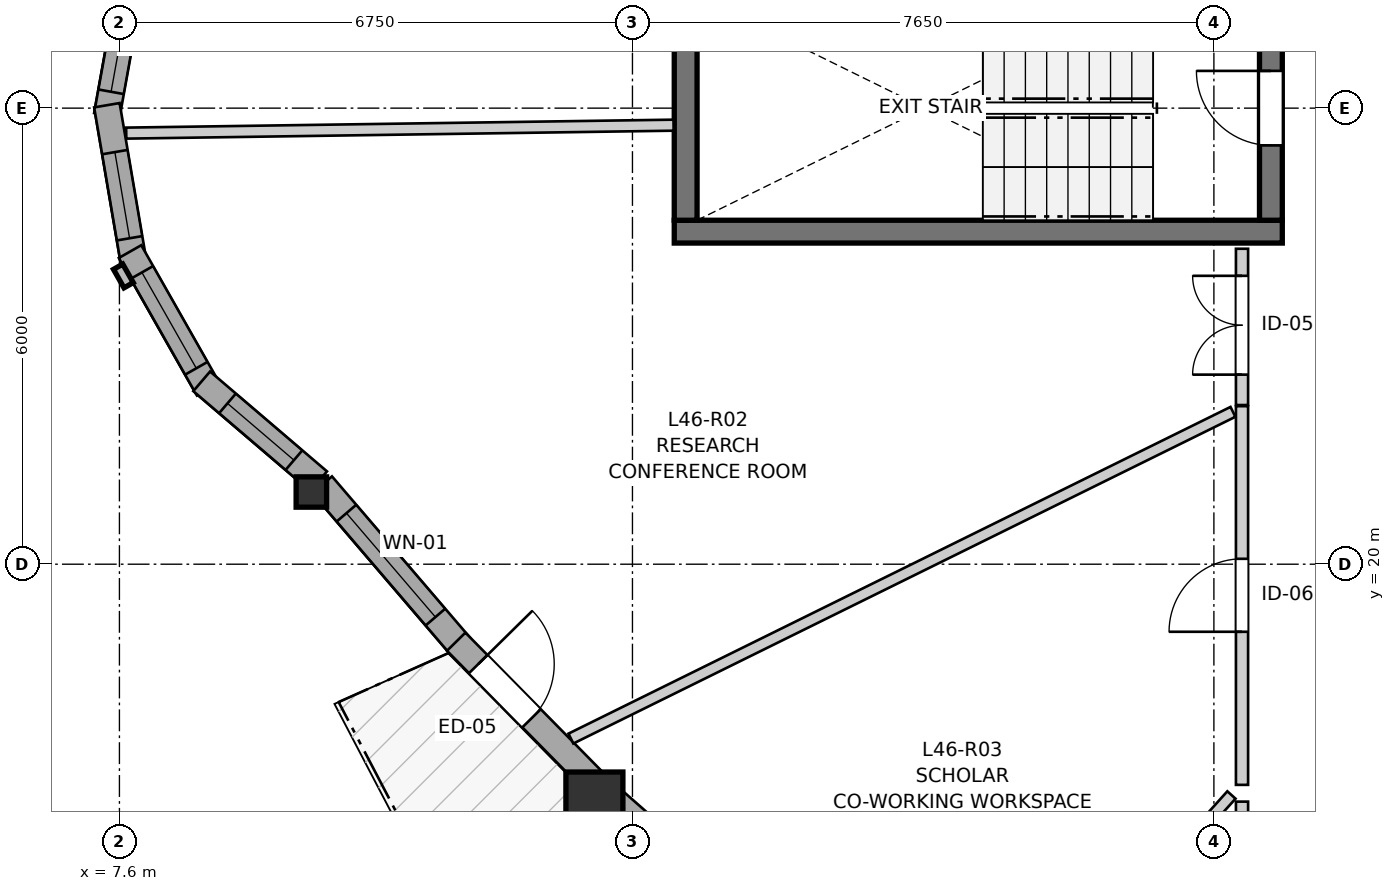
"""IFC4 building model, lengths in metres.
Left out: names, types, materials, properties, quantities, classifications, styles, units other than length and angle.
Written with IfcOpenShell. Run it as: python <this file> out.ifc"""

import sys

from ifc_helpers import new_model, si_unit, direction, frame, frame_2d, origin, origin_2d, place, context, subcontext, project, spatial, rectangle, i_section, extrude, source, transform, mapped, element, fill, save


model = new_model("IFC4")
c1 = context("Model", 3, precision=1e-05, world=origin(), true_north=direction((0.0, 1.0)))
c2 = subcontext(c1, "Body", "Model", "MODEL_VIEW")
j1 = project(units=[si_unit("LENGTHUNIT", "METRE"), si_unit("PLANEANGLEUNIT", "RADIAN")], contexts=[c1])
p1 = place(None, origin())
s1 = spatial("IfcSite", under=j1, at=p1, CompositionType="ELEMENT")
p2 = place(p1, origin())
s2 = spatial("IfcBuilding", under=s1, at=p2, CompositionType="ELEMENT")
p3 = place(p2, frame((0.0, 0.0, 155.4)))
s3 = spatial("IfcBuildingStorey", under=s2, at=p3, CompositionType="ELEMENT", Elevation=155.4)
p4 = place(p3, frame((14.9, 24.375, 0.0), z_axis=(0.0, 0.0, 1.0), x_axis=(1.0, 0.0, 0.0)))
e1 = element("IfcWall", 1, at=p4, inside=s3, PredefinedType="SHEAR", context=c2, shape_type="SweptSolid", body=[
    extrude(rectangle(XDim=8.0, YDim=0.3, at=frame_2d((4.0, 0.0))), origin(), (0.0, 0.0, 1.0), 2.935),
])
p5 = place(p3, frame((15.05, 27.475, 0.0), z_axis=(0.0, 0.0, 1.0), x_axis=(0.0, -1.0, 0.0)))
e2 = element("IfcWall", 2, at=p5, inside=s3, PredefinedType="SHEAR", context=c2, shape_type="SweptSolid", body=[
    extrude(rectangle(XDim=2.95, YDim=0.3, at=frame_2d((1.475, 0.0))), origin(), (0.0, 0.0, 1.0), 2.935),
])
p6 = place(p3, frame((22.75, 24.525, 0.0), z_axis=(0.0, 0.0, 1.0), x_axis=(0.0, 1.0, 0.0)))
e3 = element("IfcWall", 3, at=p6, inside=s3, PredefinedType="SHEAR", context=c2, shape_type="SweptSolid", body=[
    extrude(rectangle(XDim=2.95, YDim=0.3, at=frame_2d((1.475, 0.0))), origin(), (0.0, 0.0, 1.0), 2.935),
])
p7 = place(p6, frame((0.985, 0.0, 0.0)))
e4 = element("IfcOpeningElement", 4, at=p7, cuts=e3, PredefinedType="OPENING", context=c2, shape_type="SweptSolid", body=[
    extrude(rectangle(XDim=0.98, YDim=2.15, at=frame_2d((0.49, 1.075))), frame((0.0, 0.16, 0.0), z_axis=(0.0, -1.0, 0.0), x_axis=(1.0, 0.0, 0.0)), (0.0, 0.0, 1.0), 0.32),
])
m1 = source(origin(), c2, "Body", "SweptSolid", [
    extrude(i_section(OverallWidth=0.401, OverallDepth=0.399, WebThickness=0.023, FlangeThickness=0.036, FilletRadius=0.015, at=origin_2d()), origin(), (0.0, 0.0, 1.0), 2.935),
])
p8 = place(p3, frame((10.125, 20.95, 0.0), z_axis=(0.0, 0.0, 1.0), x_axis=(1.0, 0.0, 0.0)))
e5 = element("IfcColumn", 5, at=p8, inside=s3, PredefinedType="PILASTER", context=c2, shape_type="MappedRepresentation", body=[
    mapped(m1, transform((0.0, 0.0, 0.0), x_axis=(1.0, 0.0, 0.0), y_axis=(0.0, 1.0, 0.0), z_axis=(0.0, 0.0, 1.0), scale=1.0)),
])
m2 = source(origin(), c2, "Body", "SweptSolid", [
    extrude(rectangle(XDim=0.75, YDim=0.75, at=origin_2d()), origin(), (0.0, 0.0, 1.0), 2.935),
])
p9 = place(p3, frame((13.849, 16.891, 0.0), z_axis=(0.0, 0.0, 1.0), x_axis=(1.0, 0.0, 0.0)))
e6 = element("IfcColumn", 6, at=p9, inside=s3, PredefinedType="COLUMN", context=c2, shape_type="MappedRepresentation", body=[
    mapped(m2, transform((0.0, 0.0, 0.0), x_axis=(1.0, 0.0, 0.0), y_axis=(0.0, 1.0, 0.0), z_axis=(0.0, 0.0, 1.0), scale=1.0)),
])
p10 = place(p3, frame((7.804, 27.953, 0.0), z_axis=(0.0, 0.0, 1.0), x_axis=(-0.177605215389, -0.984101817632, 0.0)))
e7 = element("IfcWall", 7, at=p10, inside=s3, PredefinedType="SOLIDWALL", context=c2, shape_type="SweptSolid", body=[
    extrude(rectangle(XDim=2.081, YDim=0.34, at=frame_2d((1.041, 0.0))), origin(), (0.0, 0.0, 1.0), 2.515),
])
p11 = place(p10, frame((0.316, 0.0, 0.82)))
e8 = element("IfcOpeningElement", 8, at=p11, cuts=e7, PredefinedType="OPENING", context=c2, shape_type="SweptSolid", body=[
    extrude(rectangle(XDim=1.45, YDim=1.25, at=frame_2d((0.725, 0.625))), frame((0.0, 0.18, 0.0), z_axis=(0.0, -1.0, 0.0), x_axis=(1.0, 0.0, 0.0)), (0.0, 0.0, 1.0), 0.36),
])
p12 = place(p3, frame((7.435, 26.038, 0.0), z_axis=(0.0, 0.0, 1.0), x_axis=(0.168107405166, -0.985768685001, 0.0)))
e9 = element("IfcWall", 9, at=p12, inside=s3, PredefinedType="SOLIDWALL", context=c2, shape_type="SweptSolid", body=[
    extrude(rectangle(XDim=2.081, YDim=0.34, at=frame_2d((1.041, 0.0))), origin(), (0.0, 0.0, 1.0), 2.515),
])
p13 = place(p12, frame((0.625, 0.0, 0.82)))
e10 = element("IfcOpeningElement", 10, at=p13, cuts=e9, PredefinedType="OPENING", context=c2, shape_type="SweptSolid", body=[
    extrude(rectangle(XDim=1.15, YDim=1.2, at=frame_2d((0.575, 0.6))), frame((0.0, 0.18, 0.0), z_axis=(0.0, -1.0, 0.0), x_axis=(1.0, 0.0, 0.0)), (0.0, 0.0, 1.0), 0.36),
])
p14 = place(p3, frame((7.74, 24.113, 0.0), z_axis=(0.0, 0.0, 1.0), x_axis=(0.493660675866, -0.869654607936, 0.0)))
e11 = element("IfcWall", 11, at=p14, inside=s3, PredefinedType="SOLIDWALL", context=c2, shape_type="SweptSolid", body=[
    extrude(rectangle(XDim=2.081, YDim=0.34, at=frame_2d((1.041, 0.0))), origin(), (0.0, 0.0, 1.0), 2.515),
])
p15 = place(p14, frame((0.316, 0.0, 0.82)))
e12 = element("IfcOpeningElement", 12, at=p15, cuts=e11, PredefinedType="OPENING", context=c2, shape_type="SweptSolid", body=[
    extrude(rectangle(XDim=1.45, YDim=1.25, at=frame_2d((0.725, 0.625))), frame((0.0, 0.18, 0.0), z_axis=(0.0, -1.0, 0.0), x_axis=(1.0, 0.0, 0.0)), (0.0, 0.0, 1.0), 0.36),
])
p16 = place(p3, frame((8.682, 22.406, 0.0), z_axis=(0.0, 0.0, 1.0), x_axis=(0.760269373804, -0.649607942728, 0.0)))
e13 = element("IfcWall", 13, at=p16, inside=s3, PredefinedType="SOLIDWALL", context=c2, shape_type="SweptSolid", body=[
    extrude(rectangle(XDim=2.023, YDim=0.34, at=frame_2d((1.012, 0.0))), origin(), (0.0, 0.0, 1.0), 2.515),
])
p17 = place(p16, frame((0.447, 0.0, 0.82)))
e14 = element("IfcOpeningElement", 14, at=p17, cuts=e13, PredefinedType="OPENING", context=c2, shape_type="SweptSolid", body=[
    extrude(rectangle(XDim=1.15, YDim=1.2, at=frame_2d((0.575, 0.6))), frame((0.0, 0.18, 0.0), z_axis=(0.0, -1.0, 0.0), x_axis=(1.0, 0.0, 0.0)), (0.0, 0.0, 1.0), 0.36),
])
p18 = place(p3, frame((10.267, 21.045, 0.0), z_axis=(0.0, 0.0, 1.0), x_axis=(0.650339388137, -0.759643785098, 0.0)))
e15 = element("IfcWall", 15, at=p18, inside=s3, PredefinedType="SOLIDWALL", context=c2, shape_type="SweptSolid", body=[
    extrude(rectangle(XDim=2.803, YDim=0.34, at=frame_2d((1.402, 0.0))), origin(), (0.0, 0.0, 1.0), 2.515),
])
p19 = place(p18, frame((0.491, 0.0, 0.82)))
e16 = element("IfcOpeningElement", 16, at=p19, cuts=e15, PredefinedType="OPENING", context=c2, shape_type="SweptSolid", body=[
    extrude(rectangle(XDim=1.8, YDim=1.45, at=frame_2d((0.9, 0.725))), frame((0.0, 0.18, 0.0), z_axis=(0.0, -1.0, 0.0), x_axis=(1.0, 0.0, 0.0)), (0.0, 0.0, 1.0), 0.36),
])
p20 = place(p3, frame((12.031, 18.98, 0.0), z_axis=(0.0, 0.0, 1.0), x_axis=(0.701518749222, -0.712650997677, 0.0)))
e17 = element("IfcWall", 17, at=p20, inside=s3, PredefinedType="SOLIDWALL", context=c2, shape_type="SweptSolid", body=[
    extrude(rectangle(XDim=2.61, YDim=0.34, at=frame_2d((1.305, 0.0))), origin(), (0.0, 0.0, 1.0), 2.515),
])
p21 = place(p20, frame((0.413, 0.0, 0.0)))
e18 = element("IfcOpeningElement", 18, at=p21, cuts=e17, PredefinedType="OPENING", context=c2, shape_type="SweptSolid", body=[
    extrude(rectangle(XDim=1.0, YDim=2.1, at=frame_2d((0.5, 1.05))), frame((0.0, 0.18, 0.0), z_axis=(0.0, -1.0, 0.0), x_axis=(1.0, 0.0, 0.0)), (0.0, 0.0, 1.0), 0.36),
])
p22 = place(p3, frame((14.078, 16.916, 0.0), z_axis=(0.0, 0.0, 1.0), x_axis=(0.751177768463, -0.660099962253, 0.0)))
e19 = element("IfcWall", 19, at=p22, inside=s3, PredefinedType="SOLIDWALL", context=c2, shape_type="SweptSolid", body=[
    extrude(rectangle(XDim=2.565, YDim=0.34, at=frame_2d((1.283, 0.0))), origin(), (0.0, 0.0, 1.0), 2.515),
])
p23 = place(p22, frame((0.528, 0.0, 0.82)))
e20 = element("IfcOpeningElement", 20, at=p23, cuts=e19, PredefinedType="OPENING", context=c2, shape_type="SweptSolid", body=[
    extrude(rectangle(XDim=1.5, YDim=1.45, at=frame_2d((0.75, 0.725))), frame((0.0, 0.18, 0.0), z_axis=(0.0, -1.0, 0.0), x_axis=(1.0, 0.0, 0.0)), (0.0, 0.0, 1.0), 0.36),
])
p24 = place(p3, frame((22.37, 17.097, 0.0), z_axis=(0.0, 0.0, 1.0), x_axis=(0.0, 1.0, 0.0)))
e21 = element("IfcWall", 21, at=p24, inside=s3, PredefinedType="PARTITIONING", context=c2, shape_type="SweptSolid", body=[
    extrude(rectangle(XDim=4.982, YDim=0.16, at=frame_2d((2.491, 0.0))), origin(), (0.0, 0.0, 1.0), 2.935),
])
p25 = place(p24, frame((2.014, 0.0, 0.0)))
e22 = element("IfcOpeningElement", 22, at=p25, cuts=e21, PredefinedType="OPENING", context=c2, shape_type="SweptSolid", body=[
    extrude(rectangle(XDim=0.96, YDim=2.1, at=frame_2d((0.48, 1.05))), frame((0.0, 0.09, 0.0), z_axis=(0.0, -1.0, 0.0), x_axis=(1.0, 0.0, 0.0)), (0.0, 0.0, 1.0), 0.18),
])
p26 = place(p3, frame((22.37, 22.094, 0.0), z_axis=(0.0, 0.0, 1.0), x_axis=(0.0, 1.0, 0.0)))
e23 = element("IfcWall", 23, at=p26, inside=s3, PredefinedType="PARTITIONING", context=c2, shape_type="SweptSolid", body=[
    extrude(rectangle(XDim=2.056, YDim=0.16, at=frame_2d((1.028, 0.0))), origin(), (0.0, 0.0, 1.0), 2.935),
])
p27 = place(p26, frame((0.4, 0.0, 0.0)))
e24 = element("IfcOpeningElement", 24, at=p27, cuts=e23, PredefinedType="OPENING", context=c2, shape_type="SweptSolid", body=[
    extrude(rectangle(XDim=1.3, YDim=2.1, at=frame_2d((0.65, 1.05))), frame((0.0, 0.09, 0.0), z_axis=(0.0, -1.0, 0.0), x_axis=(1.0, 0.0, 0.0)), (0.0, 0.0, 1.0), 0.18),
])
p28 = place(p3, frame((13.54, 17.706, 0.0), z_axis=(0.0, 0.0, 1.0), x_axis=(0.896762400541, 0.442512369291, 0.0)))
e25 = element("IfcWall", 25, at=p28, inside=s3, PredefinedType="PARTITIONING", context=c2, shape_type="SweptSolid", body=[
    extrude(rectangle(XDim=9.713, YDim=0.145, at=frame_2d((4.857, 0.0))), origin(), (0.0, 0.0, 1.0), 2.935),
])
p29 = place(p3, frame((7.689, 25.671, 0.0), z_axis=(0.0, 0.0, 1.0), x_axis=(0.999894747293, 0.014508422953, 0.0)))
e26 = element("IfcWall", 26, at=p29, inside=s3, PredefinedType="PARTITIONING", context=c2, shape_type="SweptSolid", body=[
    extrude(rectangle(XDim=7.202, YDim=0.145, at=frame_2d((3.601, 0.0))), origin(), (0.0, 0.0, 1.0), 2.935),
])
p30 = place(p3, frame((18.957, 13.322, 0.0), z_axis=(0.0, 0.0, 1.0), x_axis=(0.66841369867, 0.743789706456, 0.0)))
e27 = element("IfcWall", 27, at=p30, inside=s3, PredefinedType="PARTITIONING", context=c2, shape_type="SweptSolid", body=[
    extrude(rectangle(XDim=4.897, YDim=0.145, at=frame_2d((2.449, 0.0))), origin(), (0.0, 0.0, 1.0), 2.935),
])
p31 = place(p3, frame((22.37, 14.538, 0.0), z_axis=(0.0, 0.0, 1.0), x_axis=(0.0, 1.0, 0.0)))
e28 = element("IfcWall", 28, at=p31, inside=s3, PredefinedType="PARTITIONING", context=c2, shape_type="SweptSolid", body=[
    extrude(rectangle(XDim=2.338, YDim=0.16, at=frame_2d((1.169, 0.0))), origin(), (0.0, 0.0, 1.0), 2.935),
])
m3 = source(origin(), c2, "Body", "SweptSolid", [
    extrude(rectangle(XDim=1.45, YDim=1.25, at=frame_2d((0.725, 0.625))), frame((0.0, 0.03, 0.0), z_axis=(0.0, -1.0, 0.0), x_axis=(1.0, 0.0, 0.0)), (0.0, 0.0, 1.0), 0.06),
])
p32 = place(p11, origin())
e29 = element("IfcWindow", 29, at=p32, inside=s3, PartitioningType="SINGLE_PANEL", PredefinedType="WINDOW", context=c2, shape_type="MappedRepresentation", body=[
    mapped(m3, transform((0.0, 0.0, 0.0), x_axis=(1.0, 0.0, 0.0), y_axis=(0.0, 1.0, 0.0), z_axis=(0.0, 0.0, 1.0), scale=1.0)),
])
fill(e8, e29)
m4 = source(origin(), c2, "Body", "SweptSolid", [
    extrude(rectangle(XDim=1.15, YDim=1.2, at=frame_2d((0.575, 0.6))), frame((0.0, 0.03, 0.0), z_axis=(0.0, -1.0, 0.0), x_axis=(1.0, 0.0, 0.0)), (0.0, 0.0, 1.0), 0.06),
])
p33 = place(p13, origin())
e30 = element("IfcWindow", 30, at=p33, inside=s3, PartitioningType="SINGLE_PANEL", PredefinedType="WINDOW", context=c2, shape_type="MappedRepresentation", body=[
    mapped(m4, transform((0.0, 0.0, 0.0), x_axis=(1.0, 0.0, 0.0), y_axis=(0.0, 1.0, 0.0), z_axis=(0.0, 0.0, 1.0), scale=1.0)),
])
fill(e10, e30)
p34 = place(p15, origin())
e31 = element("IfcWindow", 31, at=p34, inside=s3, PartitioningType="SINGLE_PANEL", PredefinedType="WINDOW", context=c2, shape_type="MappedRepresentation", body=[
    mapped(m3, transform((0.0, 0.0, 0.0), x_axis=(1.0, 0.0, 0.0), y_axis=(0.0, 1.0, 0.0), z_axis=(0.0, 0.0, 1.0), scale=1.0)),
])
fill(e12, e31)
p35 = place(p17, origin())
e32 = element("IfcWindow", 32, at=p35, inside=s3, PartitioningType="SINGLE_PANEL", PredefinedType="WINDOW", context=c2, shape_type="MappedRepresentation", body=[
    mapped(m4, transform((0.0, 0.0, 0.0), x_axis=(1.0, 0.0, 0.0), y_axis=(0.0, 1.0, 0.0), z_axis=(0.0, 0.0, 1.0), scale=1.0)),
])
fill(e14, e32)
m5 = source(origin(), c2, "Body", "SweptSolid", [
    extrude(rectangle(XDim=1.8, YDim=1.45, at=frame_2d((0.9, 0.725))), frame((0.0, 0.03, 0.0), z_axis=(0.0, -1.0, 0.0), x_axis=(1.0, 0.0, 0.0)), (0.0, 0.0, 1.0), 0.06),
])
p36 = place(p19, origin())
e33 = element("IfcWindow", 33, at=p36, inside=s3, PartitioningType="SINGLE_PANEL", PredefinedType="WINDOW", context=c2, shape_type="MappedRepresentation", body=[
    mapped(m5, transform((0.0, 0.0, 0.0), x_axis=(1.0, 0.0, 0.0), y_axis=(0.0, 1.0, 0.0), z_axis=(0.0, 0.0, 1.0), scale=1.0)),
])
fill(e16, e33)
m6 = source(origin(), c2, "Body", "SweptSolid", [
    extrude(rectangle(XDim=1.0, YDim=2.1, at=frame_2d((0.5, 1.05))), frame((0.0, 0.025, 0.0), z_axis=(0.0, -1.0, 0.0), x_axis=(1.0, 0.0, 0.0)), (0.0, 0.0, 1.0), 0.05),
])
p37 = place(p21, origin())
e34 = element("IfcDoor", 34, at=p37, inside=s3, OperationType="SINGLE_SWING_LEFT", PredefinedType="DOOR", context=c2, shape_type="MappedRepresentation", body=[
    mapped(m6, transform((0.0, 0.0, 0.0), x_axis=(1.0, 0.0, 0.0), y_axis=(0.0, 1.0, 0.0), z_axis=(0.0, 0.0, 1.0), scale=1.0)),
])
fill(e18, e34)
m7 = source(origin(), c2, "Body", "SweptSolid", [
    extrude(rectangle(XDim=0.98, YDim=2.15, at=frame_2d((0.49, 1.075))), frame((0.0, 0.025, 0.0), z_axis=(0.0, -1.0, 0.0), x_axis=(1.0, 0.0, 0.0)), (0.0, 0.0, 1.0), 0.05),
])
p38 = place(p7, origin())
e35 = element("IfcDoor", 35, at=p38, inside=s3, OperationType="SINGLE_SWING_RIGHT", PredefinedType="DOOR", context=c2, shape_type="MappedRepresentation", body=[
    mapped(m7, transform((0.0, 0.0, 0.0), x_axis=(1.0, 0.0, 0.0), y_axis=(0.0, 1.0, 0.0), z_axis=(0.0, 0.0, 1.0), scale=1.0)),
])
fill(e4, e35)
m8 = source(origin(), c2, "Body", "SweptSolid", [
    extrude(rectangle(XDim=0.96, YDim=2.1, at=frame_2d((0.48, 1.05))), frame((0.0, 0.025, 0.0), z_axis=(0.0, -1.0, 0.0), x_axis=(1.0, 0.0, 0.0)), (0.0, 0.0, 1.0), 0.05),
])
p39 = place(p25, origin())
e36 = element("IfcDoor", 36, at=p39, inside=s3, OperationType="SINGLE_SWING_LEFT", PredefinedType="DOOR", context=c2, shape_type="MappedRepresentation", body=[
    mapped(m8, transform((0.0, 0.0, 0.0), x_axis=(1.0, 0.0, 0.0), y_axis=(0.0, 1.0, 0.0), z_axis=(0.0, 0.0, 1.0), scale=1.0)),
])
fill(e22, e36)
m9 = source(origin(), c2, "Body", "SweptSolid", [
    extrude(rectangle(XDim=1.3, YDim=2.1, at=frame_2d((0.65, 1.05))), frame((0.0, 0.025, 0.0), z_axis=(0.0, -1.0, 0.0), x_axis=(1.0, 0.0, 0.0)), (0.0, 0.0, 1.0), 0.05),
])
p40 = place(p27, origin())
e37 = element("IfcDoor", 37, at=p40, inside=s3, OperationType="DOUBLE_DOOR_SINGLE_SWING", PredefinedType="DOOR", context=c2, shape_type="MappedRepresentation", body=[
    mapped(m9, transform((0.0, 0.0, 0.0), x_axis=(1.0, 0.0, 0.0), y_axis=(0.0, 1.0, 0.0), z_axis=(0.0, 0.0, 1.0), scale=1.0)),
])
fill(e24, e37)
save(model, sys.argv[1])
